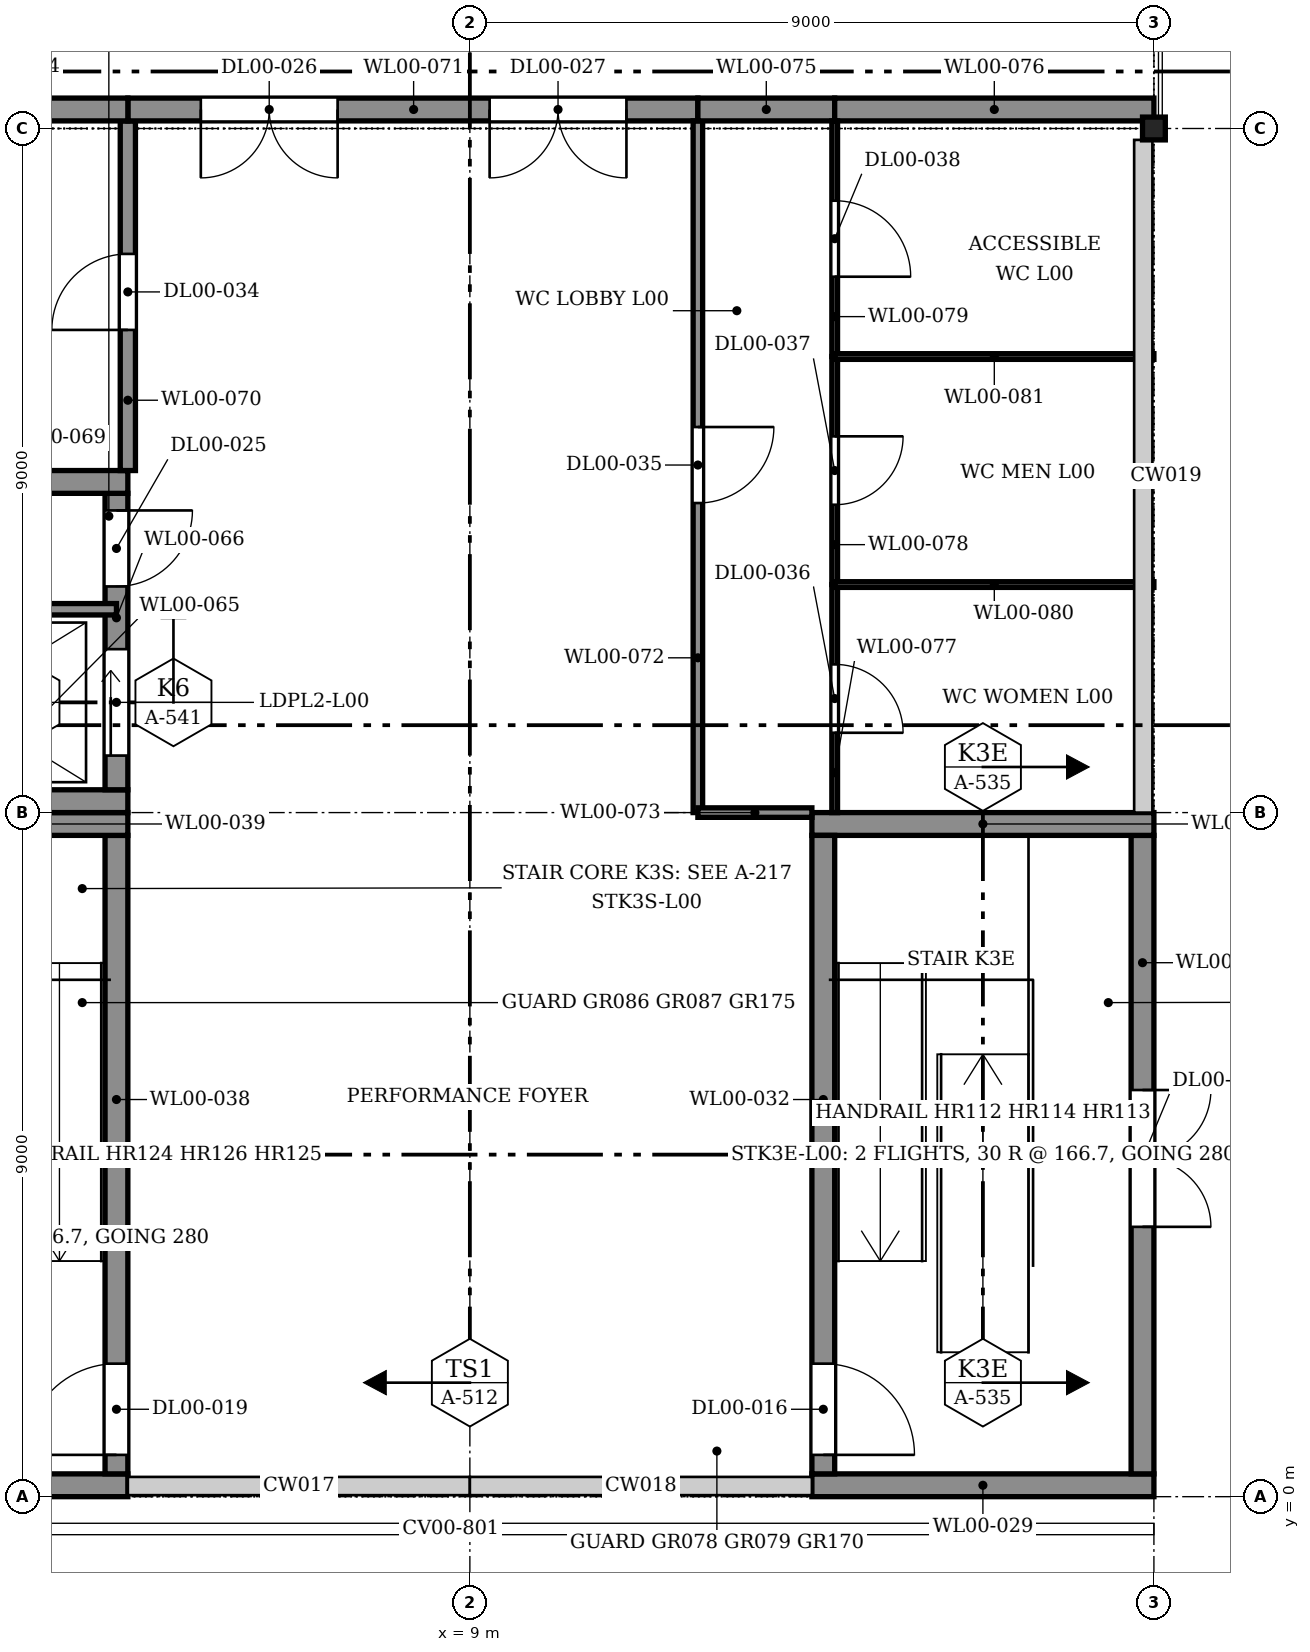
"""IFC4 building model, lengths in metres.
Left out: names, types, materials, properties, quantities, classifications, styles, units other than length and angle.
Written with IfcOpenShell. Run it as: python <this file> out.ifc"""

import sys

from ifc_helpers import new_model, si_unit, direction, frame, frame_2d, origin, origin_2d, place, context, subcontext, project, spatial, polyline, rectangle, hollow_rectangle, outline, extrude, element, fill, save


model = new_model("IFC4")
c1 = context("Model", 3, precision=1e-05, world=origin(), true_north=direction((0.0, 1.0)))
c2 = subcontext(c1, "Body", "Model", "MODEL_VIEW")
j1 = project(units=[si_unit("LENGTHUNIT", "METRE"), si_unit("PLANEANGLEUNIT", "RADIAN")], contexts=[c1])
p1 = place(None, origin())
s1 = spatial("IfcSite", under=j1, at=p1, CompositionType="ELEMENT")
p2 = place(p1, origin())
s2 = spatial("IfcBuilding", under=s1, at=p2, CompositionType="ELEMENT")
p3 = place(p2, origin())
s3 = spatial("IfcBuildingStorey", under=s2, at=p3, CompositionType="ELEMENT", Elevation=0.0)
p4 = place(p3, frame((18.0, 18.0, 0.0), z_axis=(0.0, 0.0, 1.0), x_axis=(1.0, 0.0, 0.0)))
e1 = element("IfcColumn", 1, at=p4, inside=s3, PredefinedType="COLUMN", context=c2, shape_type="SweptSolid", body=[
    extrude(hollow_rectangle(XDim=0.3, YDim=0.3, WallThickness=0.016, InnerFilletRadius=0.024, OuterFilletRadius=0.04, at=origin_2d()), origin(), (0.0, 0.0, 1.0), 5.0),
])
p5 = place(p3, frame((17.885, 18.15, 0.0), z_axis=(0.0, 0.0, 1.0), x_axis=(0.0, 1.0, 0.0)))
e2 = element("IfcWall", 2, at=p5, inside=s3, PredefinedType="SOLIDWALL", context=c2, shape_type="SweptSolid", body=[
    extrude(outline(polyline([(0.0, 0.0), (8.687, 0.0), (8.686, 15.427), (0.0, 14.732), (0.0, 0.0)])), frame((0.0, 0.175, 0.0), z_axis=(0.0, -1.0, 0.0), x_axis=(1.0, 0.0, 0.0)), (0.0, 0.0, 1.0), 0.35),
])
p6 = place(p3, frame((13.5, 0.15, 0.0), z_axis=(0.0, 0.0, 1.0), x_axis=(1.0, 0.0, 0.0)))
e3 = element("IfcWall", 3, at=p6, inside=s3, PredefinedType="SOLIDWALL", context=c2, shape_type="SweptSolid", body=[
    extrude(rectangle(XDim=4.5, YDim=0.3, at=frame_2d((2.25, 0.0))), origin(), (0.0, 0.0, 1.0), 5.0),
])
p7 = place(p3, frame((17.85, 0.3, 0.0), z_axis=(0.0, 0.0, 1.0), x_axis=(0.0, 1.0, 0.0)))
e4 = element("IfcWall", 4, at=p7, inside=s3, PredefinedType="SOLIDWALL", context=c2, shape_type="SweptSolid", body=[
    extrude(rectangle(XDim=8.4, YDim=0.3, at=frame_2d((4.2, 0.0))), origin(), (0.0, 0.0, 1.0), 5.0),
])
p8 = place(p7, frame((3.25, 0.0, 0.0)))
e5 = element("IfcOpeningElement", 5, at=p8, cuts=e4, PredefinedType="OPENING", context=c2, shape_type="SweptSolid", body=[
    extrude(rectangle(XDim=1.8, YDim=2.1, at=frame_2d((0.9, 1.05))), frame((0.0, 0.16, 0.0), z_axis=(0.0, -1.0, 0.0), x_axis=(1.0, 0.0, 0.0)), (0.0, 0.0, 1.0), 0.32),
])
p9 = place(p3, frame((13.5, 8.85, 0.0), z_axis=(0.0, 0.0, 1.0), x_axis=(1.0, 0.0, 0.0)))
e6 = element("IfcWall", 6, at=p9, inside=s3, PredefinedType="SOLIDWALL", context=c2, shape_type="SweptSolid", body=[
    extrude(rectangle(XDim=4.5, YDim=0.3, at=frame_2d((2.25, 0.0))), origin(), (0.0, 0.0, 1.0), 5.0),
])
p10 = place(p3, frame((13.65, 0.3, 0.0), z_axis=(0.0, 0.0, 1.0), x_axis=(0.0, 1.0, 0.0)))
e7 = element("IfcWall", 7, at=p10, inside=s3, PredefinedType="SOLIDWALL", context=c2, shape_type="SweptSolid", body=[
    extrude(rectangle(XDim=8.4, YDim=0.3, at=frame_2d((4.2, 0.0))), origin(), (0.0, 0.0, 1.0), 5.0),
])
p11 = place(p10, frame((0.25, 0.0, 0.0)))
e8 = element("IfcOpeningElement", 8, at=p11, cuts=e7, PredefinedType="OPENING", context=c2, shape_type="SweptSolid", body=[
    extrude(rectangle(XDim=1.2, YDim=2.1, at=frame_2d((0.6, 1.05))), frame((0.0, 0.16, 0.0), z_axis=(0.0, -1.0, 0.0), x_axis=(1.0, 0.0, 0.0)), (0.0, 0.0, 1.0), 0.32),
])
p12 = place(p3, frame((0.0, 0.15, 0.0), z_axis=(0.0, 0.0, 1.0), x_axis=(1.0, 0.0, 0.0)))
e9 = element("IfcWall", 9, at=p12, inside=s3, PredefinedType="SOLIDWALL", context=c2, shape_type="SweptSolid", body=[
    extrude(rectangle(XDim=4.5, YDim=0.3, at=frame_2d((2.25, 0.0))), origin(), (0.0, 0.0, 1.0), 5.0),
])
p13 = place(p12, frame((1.35, 0.0, 0.0)))
e10 = element("IfcOpeningElement", 10, at=p13, cuts=e9, PredefinedType="OPENING", context=c2, shape_type="SweptSolid", body=[
    extrude(rectangle(XDim=1.8, YDim=2.1, at=frame_2d((0.9, 1.05))), frame((0.0, 0.16, 0.0), z_axis=(0.0, -1.0, 0.0), x_axis=(1.0, 0.0, 0.0)), (0.0, 0.0, 1.0), 0.32),
])
p14 = place(p3, frame((4.35, 0.3, 0.0), z_axis=(0.0, 0.0, 1.0), x_axis=(0.0, 1.0, 0.0)))
e11 = element("IfcWall", 11, at=p14, inside=s3, PredefinedType="SOLIDWALL", context=c2, shape_type="SweptSolid", body=[
    extrude(rectangle(XDim=8.4, YDim=0.3, at=frame_2d((4.2, 0.0))), origin(), (0.0, 0.0, 1.0), 5.0),
])
p15 = place(p14, frame((0.25, 0.0, 0.0)))
e12 = element("IfcOpeningElement", 12, at=p15, cuts=e11, PredefinedType="OPENING", context=c2, shape_type="SweptSolid", body=[
    extrude(rectangle(XDim=1.2, YDim=2.1, at=frame_2d((0.6, 1.05))), frame((0.0, 0.16, 0.0), z_axis=(0.0, -1.0, 0.0), x_axis=(1.0, 0.0, 0.0)), (0.0, 0.0, 1.0), 0.32),
])
for number, where, z_axis, x_axis in (
    (13, (0.0, 8.85, 0.0), (0.0, 0.0, 1.0), (1.0, 0.0, 0.0)),
    (14, (0.0, 9.15, 0.0), (0.0, 0.0, 1.0), (1.0, 0.0, 0.0)),
):
    element("IfcWall", number, at=place(p3, frame(where, z_axis=z_axis, x_axis=x_axis)), inside=s3, PredefinedType="SOLIDWALL", context=c2, shape_type="SweptSolid", body=[
        extrude(rectangle(XDim=4.5, YDim=0.3, at=frame_2d((2.25, 0.0))), origin(), (0.0, 0.0, 1.0), 5.0),
    ])
p16 = place(p3, frame((4.35, 9.3, 0.0), z_axis=(0.0, 0.0, 1.0), x_axis=(0.0, 1.0, 0.0)))
e15 = element("IfcWall", 15, at=p16, inside=s3, PredefinedType="SOLIDWALL", context=c2, shape_type="SweptSolid", body=[
    extrude(rectangle(XDim=3.9, YDim=0.3, at=frame_2d((1.95, 0.0))), origin(), (0.0, 0.0, 1.0), 5.0),
])
p17 = place(p16, frame((0.45, 0.0, 0.0)))
e16 = element("IfcOpeningElement", 16, at=p17, cuts=e15, PredefinedType="OPENING", context=c2, shape_type="SweptSolid", body=[
    extrude(rectangle(XDim=1.4, YDim=2.1, at=frame_2d((0.7, 1.05))), frame((0.0, 0.16, 0.0), z_axis=(0.0, -1.0, 0.0), x_axis=(1.0, 0.0, 0.0)), (0.0, 0.0, 1.0), 0.32),
])
p18 = place(p16, frame((2.675, 0.0, 0.0)))
e17 = element("IfcOpeningElement", 17, at=p18, cuts=e15, PredefinedType="OPENING", context=c2, shape_type="SweptSolid", body=[
    extrude(rectangle(XDim=1.0, YDim=2.1, at=frame_2d((0.5, 1.05))), frame((0.0, 0.16, 0.0), z_axis=(0.0, -1.0, 0.0), x_axis=(1.0, 0.0, 0.0)), (0.0, 0.0, 1.0), 0.32),
])
p19 = place(p3, frame((0.0, 13.35, 0.0), z_axis=(0.0, 0.0, 1.0), x_axis=(1.0, 0.0, 0.0)))
e18 = element("IfcWall", 18, at=p19, inside=s3, PredefinedType="SOLIDWALL", context=c2, shape_type="SweptSolid", body=[
    extrude(rectangle(XDim=4.5, YDim=0.3, at=frame_2d((2.25, 0.0))), origin(), (0.0, 0.0, 1.0), 5.0),
])
p20 = place(p3, frame((0.15, 11.675, 0.0), z_axis=(0.0, 0.0, 1.0), x_axis=(1.0, 0.0, 0.0)))
e19 = element("IfcWall", 19, at=p20, inside=s3, PredefinedType="SOLIDWALL", context=c2, shape_type="SweptSolid", body=[
    extrude(rectangle(XDim=4.2, YDim=0.15, at=frame_2d((2.1, 0.0))), origin(), (0.0, 0.0, 1.0), 5.0),
])
p21 = place(p3, frame((4.5, 13.5, 0.0), z_axis=(0.0, 0.0, 1.0), x_axis=(0.0, 1.0, 0.0)))
e20 = element("IfcWall", 20, at=p21, inside=s3, PredefinedType="PARTITIONING", context=c2, shape_type="SweptSolid", body=[
    extrude(rectangle(XDim=4.6, YDim=0.2, at=frame_2d((2.3, 0.0))), origin(), (0.0, 0.0, 1.0), 3.825),
])
p22 = place(p21, frame((1.85, 0.0, 0.0)))
e21 = element("IfcOpeningElement", 21, at=p22, cuts=e20, PredefinedType="OPENING", context=c2, shape_type="SweptSolid", body=[
    extrude(rectangle(XDim=1.0, YDim=2.1, at=frame_2d((0.5, 1.05))), frame((0.0, 0.11, 0.0), z_axis=(0.0, -1.0, 0.0), x_axis=(1.0, 0.0, 0.0)), (0.0, 0.0, 1.0), 0.22),
])
p23 = place(p3, frame((4.5, 18.25, -0.038), z_axis=(0.0, 0.0, 1.0), x_axis=(1.0, 0.0, 0.0)))
e22 = element("IfcWall", 22, at=p23, inside=s3, PredefinedType="PARTITIONING", context=c2, shape_type="SweptSolid", body=[
    extrude(rectangle(XDim=7.5, YDim=0.3, at=frame_2d((3.75, 0.0))), origin(), (0.0, 0.0, 1.0), 12.428),
])
p24 = place(p23, frame((0.96, 0.0, 0.0)))
e23 = element("IfcOpeningElement", 23, at=p24, cuts=e22, PredefinedType="OPENING", context=c2, shape_type="SweptSolid", body=[
    extrude(rectangle(XDim=1.8, YDim=2.1, at=frame_2d((0.9, 1.05))), frame((0.0, 0.16, 0.0), z_axis=(0.0, -1.0, 0.0), x_axis=(1.0, 0.0, 0.0)), (0.0, 0.0, 1.0), 0.32),
])
p25 = place(p23, frame((4.76, 0.0, 0.0)))
e24 = element("IfcOpeningElement", 24, at=p25, cuts=e22, PredefinedType="OPENING", context=c2, shape_type="SweptSolid", body=[
    extrude(rectangle(XDim=1.8, YDim=2.1, at=frame_2d((0.9, 1.05))), frame((0.0, 0.16, 0.0), z_axis=(0.0, -1.0, 0.0), x_axis=(1.0, 0.0, 0.0)), (0.0, 0.0, 1.0), 0.32),
])
p26 = place(p3, frame((12.0, 9.0, 0.0), z_axis=(0.0, 0.0, 1.0), x_axis=(0.0, 1.0, 0.0)))
e25 = element("IfcWall", 25, at=p26, inside=s3, PredefinedType="PARTITIONING", context=c2, shape_type="SweptSolid", body=[
    extrude(rectangle(XDim=9.1, YDim=0.125, at=frame_2d((4.55, 0.0))), origin(), (0.0, 0.0, 1.0), 3.825),
])
p27 = place(p26, frame((4.073, 0.0, 0.0)))
e26 = element("IfcOpeningElement", 26, at=p27, cuts=e25, PredefinedType="OPENING", context=c2, shape_type="SweptSolid", body=[
    extrude(rectangle(XDim=1.0, YDim=2.1, at=frame_2d((0.5, 1.05))), frame((0.0, 0.073, 0.0), z_axis=(0.0, -1.0, 0.0), x_axis=(1.0, 0.0, 0.0)), (0.0, 0.0, 1.0), 0.145),
])
p28 = place(p3, frame((12.0, 9.0, 0.0), z_axis=(0.0, 0.0, 1.0), x_axis=(1.0, 0.0, 0.0)))
e27 = element("IfcWall", 27, at=p28, inside=s3, PredefinedType="PARTITIONING", context=c2, shape_type="SweptSolid", body=[
    extrude(rectangle(XDim=1.5, YDim=0.125, at=frame_2d((0.75, 0.0))), origin(), (0.0, 0.0, 1.0), 4.302),
])
p29 = place(p3, frame((0.25, 18.25, -0.038), z_axis=(0.0, 0.0, 1.0), x_axis=(1.0, 0.0, 0.0)))
e28 = element("IfcWall", 28, at=p29, inside=s3, PredefinedType="PARTITIONING", context=c2, shape_type="SweptSolid", body=[
    extrude(rectangle(XDim=4.25, YDim=0.3, at=frame_2d((2.125, 0.0))), origin(), (0.0, 0.0, 1.0), 12.428),
])
p30 = place(p3, frame((12.0, 18.25, -0.038), z_axis=(0.0, 0.0, 1.0), x_axis=(1.0, 0.0, 0.0)))
e29 = element("IfcWall", 29, at=p30, inside=s3, PredefinedType="PARTITIONING", context=c2, shape_type="SweptSolid", body=[
    extrude(rectangle(XDim=1.8, YDim=0.3, at=frame_2d((0.9, 0.0))), origin(), (0.0, 0.0, 1.0), 12.428),
])
p31 = place(p3, frame((13.8, 18.25, -0.038), z_axis=(0.0, 0.0, 1.0), x_axis=(1.0, 0.0, 0.0)))
e30 = element("IfcWall", 30, at=p31, inside=s3, PredefinedType="PARTITIONING", context=c2, shape_type="SweptSolid", body=[
    extrude(rectangle(XDim=4.2, YDim=0.3, at=frame_2d((2.1, 0.0))), origin(), (0.0, 0.0, 1.0), 12.428),
])
p32 = place(p3, frame((13.8, 9.0, 0.0), z_axis=(0.0, 0.0, 1.0), x_axis=(0.0, 1.0, 0.0)))
e31 = element("IfcWall", 31, at=p32, inside=s3, PredefinedType="PARTITIONING", context=c2, shape_type="SweptSolid", body=[
    extrude(rectangle(XDim=3.0, YDim=0.075, at=frame_2d((1.5, 0.0))), origin(), (0.0, 0.0, 1.0), 4.835),
])
p33 = place(p32, frame((1.05, 0.0, 0.0)))
e32 = element("IfcOpeningElement", 32, at=p33, cuts=e31, PredefinedType="OPENING", context=c2, shape_type="SweptSolid", body=[
    extrude(rectangle(XDim=0.9, YDim=2.1, at=frame_2d((0.45, 1.05))), frame((0.0, 0.047, 0.0), z_axis=(0.0, -1.0, 0.0), x_axis=(1.0, 0.0, 0.0)), (0.0, 0.0, 1.0), 0.095),
])
p34 = place(p3, frame((13.8, 12.0, 0.0), z_axis=(0.0, 0.0, 1.0), x_axis=(0.0, 1.0, 0.0)))
e33 = element("IfcWall", 33, at=p34, inside=s3, PredefinedType="PARTITIONING", context=c2, shape_type="SweptSolid", body=[
    extrude(rectangle(XDim=3.0, YDim=0.075, at=frame_2d((1.5, 0.0))), origin(), (0.0, 0.0, 1.0), 4.835),
])
p35 = place(p34, frame((1.05, 0.0, 0.0)))
e34 = element("IfcOpeningElement", 34, at=p35, cuts=e33, PredefinedType="OPENING", context=c2, shape_type="SweptSolid", body=[
    extrude(rectangle(XDim=0.9, YDim=2.1, at=frame_2d((0.45, 1.05))), frame((0.0, 0.047, 0.0), z_axis=(0.0, -1.0, 0.0), x_axis=(1.0, 0.0, 0.0)), (0.0, 0.0, 1.0), 0.095),
])
p36 = place(p3, frame((13.8, 15.0, 0.0), z_axis=(0.0, 0.0, 1.0), x_axis=(0.0, 1.0, 0.0)))
e35 = element("IfcWall", 35, at=p36, inside=s3, PredefinedType="PARTITIONING", context=c2, shape_type="SweptSolid", body=[
    extrude(rectangle(XDim=3.1, YDim=0.075, at=frame_2d((1.55, 0.0))), origin(), (0.0, 0.0, 1.0), 3.825),
])
p37 = place(p36, frame((1.05, 0.0, 0.0)))
e36 = element("IfcOpeningElement", 36, at=p37, cuts=e35, PredefinedType="OPENING", context=c2, shape_type="SweptSolid", body=[
    extrude(rectangle(XDim=1.0, YDim=2.1, at=frame_2d((0.5, 1.05))), frame((0.0, 0.047, 0.0), z_axis=(0.0, -1.0, 0.0), x_axis=(1.0, 0.0, 0.0)), (0.0, 0.0, 1.0), 0.095),
])
for number, where, z_axis, x_axis in (
    (37, (13.8, 12.0, 0.0), (0.0, 0.0, 1.0), (1.0, 0.0, 0.0)),
    (38, (13.8, 15.0, 0.0), (0.0, 0.0, 1.0), (1.0, 0.0, 0.0)),
):
    element("IfcWall", number, at=place(p3, frame(where, z_axis=z_axis, x_axis=x_axis)), inside=s3, PredefinedType="PARTITIONING", context=c2, shape_type="SweptSolid", body=[
        extrude(rectangle(XDim=4.2, YDim=0.075, at=frame_2d((2.1, 0.0))), origin(), (0.0, 0.0, 1.0), 4.378),
    ])
p38 = place(p8, frame((1.8, 0.0, 0.0), z_axis=(0.0, 0.0, 1.0), x_axis=(-1.0, 0.0, 0.0)))
e39 = element("IfcDoor", 39, at=p38, inside=s3, OperationType="DOUBLE_DOOR_SINGLE_SWING", PredefinedType="DOOR", context=c2, shape_type="SweptSolid", body=[
    extrude(rectangle(XDim=1.8, YDim=2.1, at=frame_2d((0.9, 1.05))), frame((0.0, 0.025, 0.0), z_axis=(0.0, -1.0, 0.0), x_axis=(1.0, 0.0, 0.0)), (0.0, 0.0, 1.0), 0.05),
])
fill(e5, e39)
p39 = place(p11, frame((1.2, 0.0, 0.0), z_axis=(0.0, 0.0, 1.0), x_axis=(-1.0, 0.0, 0.0)))
e40 = element("IfcDoor", 40, at=p39, inside=s3, OperationType="SINGLE_SWING_LEFT", PredefinedType="DOOR", context=c2, shape_type="SweptSolid", body=[
    extrude(rectangle(XDim=1.2, YDim=2.1, at=frame_2d((0.6, 1.05))), frame((0.0, 0.025, 0.0), z_axis=(0.0, -1.0, 0.0), x_axis=(1.0, 0.0, 0.0)), (0.0, 0.0, 1.0), 0.05),
])
fill(e8, e40)
p40 = place(p15, origin())
e41 = element("IfcDoor", 41, at=p40, inside=s3, OperationType="SINGLE_SWING_RIGHT", PredefinedType="DOOR", context=c2, shape_type="SweptSolid", body=[
    extrude(rectangle(XDim=1.2, YDim=2.1, at=frame_2d((0.6, 1.05))), frame((0.0, 0.025, 0.0), z_axis=(0.0, -1.0, 0.0), x_axis=(1.0, 0.0, 0.0)), (0.0, 0.0, 1.0), 0.05),
])
fill(e12, e41)
p41 = place(p17, origin())
e42 = element("IfcDoor", 42, at=p41, inside=s3, OperationType="SLIDING_TO_LEFT", PredefinedType="DOOR", context=c2, shape_type="SweptSolid", body=[
    extrude(rectangle(XDim=1.4, YDim=2.1, at=frame_2d((0.7, 1.05))), frame((0.0, 0.025, 0.0), z_axis=(0.0, -1.0, 0.0), x_axis=(1.0, 0.0, 0.0)), (0.0, 0.0, 1.0), 0.05),
])
fill(e16, e42)
p42 = place(p18, frame((1.0, 0.0, 0.0), z_axis=(0.0, 0.0, 1.0), x_axis=(-1.0, 0.0, 0.0)))
e43 = element("IfcDoor", 43, at=p42, inside=s3, OperationType="SINGLE_SWING_RIGHT", PredefinedType="DOOR", context=c2, shape_type="SweptSolid", body=[
    extrude(rectangle(XDim=1.0, YDim=2.1, at=frame_2d((0.5, 1.05))), frame((0.0, 0.025, 0.0), z_axis=(0.0, -1.0, 0.0), x_axis=(1.0, 0.0, 0.0)), (0.0, 0.0, 1.0), 0.05),
])
fill(e17, e43)
p43 = place(p24, frame((1.8, 0.0, 0.0), z_axis=(0.0, 0.0, 1.0), x_axis=(-1.0, 0.0, 0.0)))
e44 = element("IfcDoor", 44, at=p43, inside=s3, OperationType="DOUBLE_DOOR_SINGLE_SWING", PredefinedType="DOOR", context=c2, shape_type="SweptSolid", body=[
    extrude(rectangle(XDim=1.8, YDim=2.1, at=frame_2d((0.9, 1.05))), frame((0.0, 0.025, 0.0), z_axis=(0.0, -1.0, 0.0), x_axis=(1.0, 0.0, 0.0)), (0.0, 0.0, 1.0), 0.05),
])
fill(e23, e44)
p44 = place(p25, frame((1.8, 0.0, 0.0), z_axis=(0.0, 0.0, 1.0), x_axis=(-1.0, 0.0, 0.0)))
e45 = element("IfcDoor", 45, at=p44, inside=s3, OperationType="DOUBLE_DOOR_SINGLE_SWING", PredefinedType="DOOR", context=c2, shape_type="SweptSolid", body=[
    extrude(rectangle(XDim=1.8, YDim=2.1, at=frame_2d((0.9, 1.05))), frame((0.0, 0.025, 0.0), z_axis=(0.0, -1.0, 0.0), x_axis=(1.0, 0.0, 0.0)), (0.0, 0.0, 1.0), 0.05),
])
fill(e24, e45)
p45 = place(p22, origin())
e46 = element("IfcDoor", 46, at=p45, inside=s3, OperationType="SINGLE_SWING_RIGHT", PredefinedType="DOOR", context=c2, shape_type="SweptSolid", body=[
    extrude(rectangle(XDim=1.0, YDim=2.1, at=frame_2d((0.5, 1.05))), frame((0.0, 0.025, 0.0), z_axis=(0.0, -1.0, 0.0), x_axis=(1.0, 0.0, 0.0)), (0.0, 0.0, 1.0), 0.05),
])
fill(e21, e46)
p46 = place(p27, frame((1.0, 0.0, 0.0), z_axis=(0.0, 0.0, 1.0), x_axis=(-1.0, 0.0, 0.0)))
e47 = element("IfcDoor", 47, at=p46, inside=s3, OperationType="SINGLE_SWING_RIGHT", PredefinedType="DOOR", context=c2, shape_type="SweptSolid", body=[
    extrude(rectangle(XDim=1.0, YDim=2.1, at=frame_2d((0.5, 1.05))), frame((0.0, 0.025, 0.0), z_axis=(0.0, -1.0, 0.0), x_axis=(1.0, 0.0, 0.0)), (0.0, 0.0, 1.0), 0.05),
])
fill(e26, e47)
p47 = place(p33, frame((0.9, 0.0, 0.0), z_axis=(0.0, 0.0, 1.0), x_axis=(-1.0, 0.0, 0.0)))
e48 = element("IfcDoor", 48, at=p47, inside=s3, OperationType="SINGLE_SWING_LEFT", PredefinedType="DOOR", context=c2, shape_type="SweptSolid", body=[
    extrude(rectangle(XDim=0.9, YDim=2.1, at=frame_2d((0.45, 1.05))), frame((0.0, 0.025, 0.0), z_axis=(0.0, -1.0, 0.0), x_axis=(1.0, 0.0, 0.0)), (0.0, 0.0, 1.0), 0.05),
])
fill(e32, e48)
p48 = place(p35, frame((0.9, 0.0, 0.0), z_axis=(0.0, 0.0, 1.0), x_axis=(-1.0, 0.0, 0.0)))
e49 = element("IfcDoor", 49, at=p48, inside=s3, OperationType="SINGLE_SWING_RIGHT", PredefinedType="DOOR", context=c2, shape_type="SweptSolid", body=[
    extrude(rectangle(XDim=0.9, YDim=2.1, at=frame_2d((0.45, 1.05))), frame((0.0, 0.025, 0.0), z_axis=(0.0, -1.0, 0.0), x_axis=(1.0, 0.0, 0.0)), (0.0, 0.0, 1.0), 0.05),
])
fill(e34, e49)
p49 = place(p37, frame((1.0, 0.0, 0.0), z_axis=(0.0, 0.0, 1.0), x_axis=(-1.0, 0.0, 0.0)))
e50 = element("IfcDoor", 50, at=p49, inside=s3, OperationType="SINGLE_SWING_LEFT", PredefinedType="DOOR", context=c2, shape_type="SweptSolid", body=[
    extrude(rectangle(XDim=1.0, YDim=2.1, at=frame_2d((0.5, 1.05))), frame((0.0, 0.025, 0.0), z_axis=(0.0, -1.0, 0.0), x_axis=(1.0, 0.0, 0.0)), (0.0, 0.0, 1.0), 0.05),
])
fill(e36, e50)
save(model, sys.argv[1])
